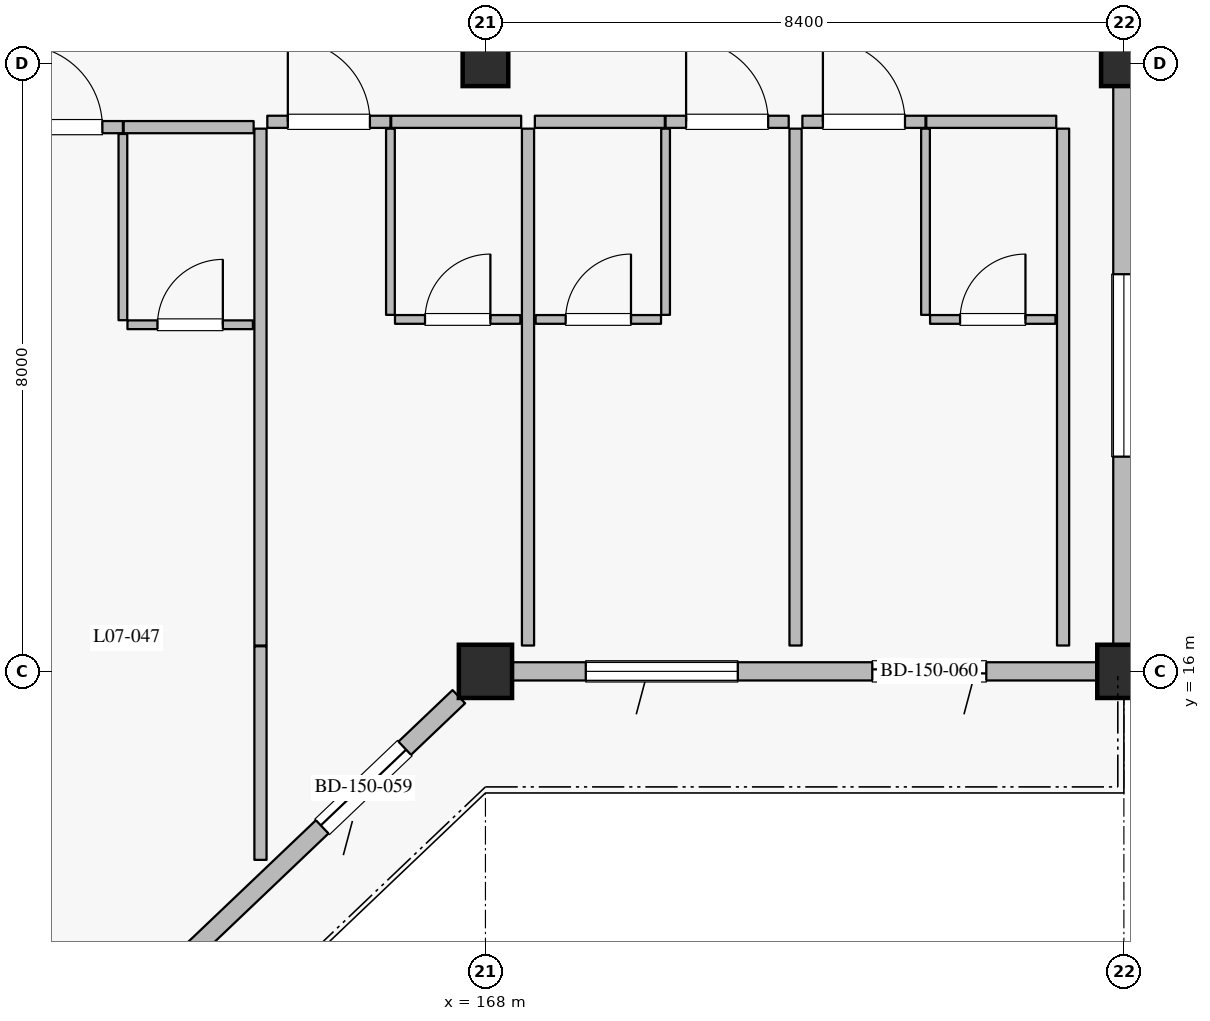
"""IFC4 building model, lengths in metres.
Left out: names, types, materials, properties, quantities, classifications, styles, units other than length and angle.
Written with IfcOpenShell. Run it as: python <this file> out.ifc"""

import sys

from ifc_helpers import new_model, si_unit, direction, frame, frame_2d, origin, origin_2d, place, context, subcontext, project, spatial, rectangle, extrude, element, fill, save


model = new_model("IFC4")
c1 = context("Model", 3, precision=1e-05, world=origin(), true_north=direction((0.0, 1.0)))
c2 = subcontext(c1, "Body", "Model", "MODEL_VIEW")
j1 = project(units=[si_unit("LENGTHUNIT", "METRE"), si_unit("PLANEANGLEUNIT", "RADIAN")], contexts=[c1])
p1 = place(None, origin())
s1 = spatial("IfcSite", under=j1, at=p1, CompositionType="ELEMENT")
p2 = place(p1, origin())
s2 = spatial("IfcBuilding", under=s1, at=p2, CompositionType="ELEMENT")
p3 = place(p2, frame((0.0, 0.0, 32.4)))
s3 = spatial("IfcBuildingStorey", under=s2, at=p3, CompositionType="ELEMENT", Elevation=32.4)
for number, where, z_axis, x_axis in (
    (1, (168.0, 16.0, 0.0), (0.0, 0.0, 1.0), (1.0, 0.0, 0.0)),
    (2, (176.4, 16.0, 0.0), (0.0, 0.0, 1.0), (1.0, 0.0, 0.0)),
):
    element("IfcColumn", number, at=place(p3, frame(where, z_axis=z_axis, x_axis=x_axis)), inside=s3, PredefinedType="COLUMN", context=c2, shape_type="SweptSolid", body=[
        extrude(rectangle(XDim=0.7, YDim=0.7, at=origin_2d()), origin(), (0.0, 0.0, 1.0), 3.6),
    ])
for number, where, z_axis, x_axis in (
    (3, (168.0, 24.0, 0.0), (0.0, 0.0, 1.0), (1.0, 0.0, 0.0)),
    (4, (176.4, 24.0, 0.0), (0.0, 0.0, 1.0), (1.0, 0.0, 0.0)),
):
    element("IfcColumn", number, at=place(p3, frame(where, z_axis=z_axis, x_axis=x_axis)), inside=s3, PredefinedType="COLUMN", context=c2, shape_type="SweptSolid", body=[
        extrude(rectangle(XDim=0.6, YDim=0.6, at=origin_2d()), origin(), (0.0, 0.0, 1.0), 3.6),
    ])
p4 = place(p3, frame((167.65, 15.667, 0.0), z_axis=(0.0, 0.0, 1.0), x_axis=(-0.724105170588, -0.689689569247, 0.0)))
e5 = element("IfcWall", 5, at=p4, inside=s3, PredefinedType="SOLIDWALL", context=c2, shape_type="SweptSolid", body=[
    extrude(rectangle(XDim=10.634, YDim=0.24, at=frame_2d((5.317, 0.0))), origin(), (0.0, 0.0, 1.0), 2.89),
])
p5 = place(p4, frame((0.983, 0.0, 0.0)))
e6 = element("IfcOpeningElement", 6, at=p5, cuts=e5, PredefinedType="OPENING", context=c2, shape_type="SweptSolid", body=[
    extrude(rectangle(XDim=1.5, YDim=2.25, at=frame_2d((0.75, 1.125))), frame((0.0, 0.13, 0.0), z_axis=(0.0, -1.0, 0.0), x_axis=(1.0, 0.0, 0.0)), (0.0, 0.0, 1.0), 0.26),
])
p6 = place(p4, frame((5.035, 0.0, 0.8)))
e7 = element("IfcOpeningElement", 7, at=p6, cuts=e5, PredefinedType="OPENING", context=c2, shape_type="SweptSolid", body=[
    extrude(rectangle(XDim=2.0, YDim=1.75, at=frame_2d((1.0, 0.875))), frame((0.0, 0.13, 0.0), z_axis=(0.0, -1.0, 0.0), x_axis=(1.0, 0.0, 0.0)), (0.0, 0.0, 1.0), 0.26),
])
p7 = place(p4, frame((8.819, 0.0, 0.8)))
e8 = element("IfcOpeningElement", 8, at=p7, cuts=e5, PredefinedType="OPENING", context=c2, shape_type="SweptSolid", body=[
    extrude(rectangle(XDim=1.6, YDim=1.6, at=frame_2d((0.8, 0.8))), frame((0.0, 0.13, 0.0), z_axis=(0.0, -1.0, 0.0), x_axis=(1.0, 0.0, 0.0)), (0.0, 0.0, 1.0), 0.26),
])
p8 = place(p3, frame((176.05, 16.0, 0.0), z_axis=(0.0, 0.0, 1.0), x_axis=(-1.0, 0.0, 0.0)))
e9 = element("IfcWall", 9, at=p8, inside=s3, PredefinedType="SOLIDWALL", context=c2, shape_type="SweptSolid", body=[
    extrude(rectangle(XDim=7.7, YDim=0.24, at=frame_2d((3.85, 0.0))), origin(), (0.0, 0.0, 1.0), 2.89),
])
p9 = place(p8, frame((1.46, 0.0, 0.0)))
e10 = element("IfcOpeningElement", 10, at=p9, cuts=e9, PredefinedType="OPENING", context=c2, shape_type="SweptSolid", body=[
    extrude(rectangle(XDim=1.5, YDim=2.25, at=frame_2d((0.75, 1.125))), frame((0.0, 0.13, 0.0), z_axis=(0.0, -1.0, 0.0), x_axis=(1.0, 0.0, 0.0)), (0.0, 0.0, 1.0), 0.26),
])
p10 = place(p8, frame((4.73, 0.0, 0.8)))
e11 = element("IfcOpeningElement", 11, at=p10, cuts=e9, PredefinedType="OPENING", context=c2, shape_type="SweptSolid", body=[
    extrude(rectangle(XDim=2.0, YDim=1.75, at=frame_2d((1.0, 0.875))), frame((0.0, 0.13, 0.0), z_axis=(0.0, -1.0, 0.0), x_axis=(1.0, 0.0, 0.0)), (0.0, 0.0, 1.0), 0.26),
])
p11 = place(p3, frame((176.4, 23.7, 0.0), z_axis=(0.0, 0.0, 1.0), x_axis=(0.0, -1.0, 0.0)))
e12 = element("IfcWall", 12, at=p11, inside=s3, PredefinedType="SOLIDWALL", context=c2, shape_type="SweptSolid", body=[
    extrude(rectangle(XDim=7.35, YDim=0.28, at=frame_2d((3.675, 0.0))), origin(), (0.0, 0.0, 1.0), 2.7),
])
p12 = place(p11, frame((2.475, 0.0, 0.5)))
e13 = element("IfcOpeningElement", 13, at=p12, cuts=e12, PredefinedType="OPENING", context=c2, shape_type="SweptSolid", body=[
    extrude(rectangle(XDim=2.4, YDim=1.65, at=frame_2d((1.2, 0.825))), frame((0.0, 0.15, 0.0), z_axis=(0.0, -1.0, 0.0), x_axis=(1.0, 0.0, 0.0)), (0.0, 0.0, 1.0), 0.3),
])
p13 = place(p3, frame((161.61, 23.16, 0.0), z_axis=(0.0, 0.0, 1.0), x_axis=(1.0, 0.0, 0.0)))
e14 = element("IfcWall", 14, at=p13, inside=s3, PredefinedType="PARTITIONING", context=c2, shape_type="SweptSolid", body=[
    extrude(rectangle(XDim=1.62, YDim=0.16, at=frame_2d((0.81, 0.0))), origin(), (0.0, 0.0, 1.0), 3.335),
])
p14 = place(p13, frame((0.27, 0.0, 0.0)))
e15 = element("IfcOpeningElement", 15, at=p14, cuts=e14, PredefinedType="OPENING", context=c2, shape_type="SweptSolid", body=[
    extrude(rectangle(XDim=1.08, YDim=2.3, at=frame_2d((0.54, 1.15))), frame((0.0, 0.09, 0.0), z_axis=(0.0, -1.0, 0.0), x_axis=(1.0, 0.0, 0.0)), (0.0, 0.0, 1.0), 0.18),
])
p15 = place(p3, frame((163.24, 23.16, 0.0), z_axis=(0.0, 0.0, 1.0), x_axis=(1.0, 0.0, 0.0)))
e16 = element("IfcWall", 16, at=p15, inside=s3, PredefinedType="PARTITIONING", context=c2, shape_type="SweptSolid", body=[
    extrude(rectangle(XDim=1.71, YDim=0.16, at=frame_2d((0.855, 0.0))), origin(), (0.0, 0.0, 1.0), 3.335),
])
p16 = place(p3, frame((163.23, 20.62, 0.0), z_axis=(0.0, 0.0, 1.0), x_axis=(0.0, 1.0, 0.0)))
e17 = element("IfcWall", 17, at=p16, inside=s3, PredefinedType="PARTITIONING", context=c2, shape_type="SweptSolid", body=[
    extrude(rectangle(XDim=2.45, YDim=0.115, at=frame_2d((1.225, 0.0))), origin(), (0.0, 0.0, 1.0), 3.335),
])
p17 = place(p3, frame((163.29, 20.56, 0.0), z_axis=(0.0, 0.0, 1.0), x_axis=(1.0, 0.0, 0.0)))
e18 = element("IfcWall", 18, at=p17, inside=s3, PredefinedType="PARTITIONING", context=c2, shape_type="SweptSolid", body=[
    extrude(rectangle(XDim=1.65, YDim=0.115, at=frame_2d((0.825, 0.0))), origin(), (0.0, 0.0, 1.0), 3.335),
])
p18 = place(p17, frame((0.395, 0.0, 0.0)))
e19 = element("IfcOpeningElement", 19, at=p18, cuts=e18, PredefinedType="OPENING", context=c2, shape_type="SweptSolid", body=[
    extrude(rectangle(XDim=0.86, YDim=2.12, at=frame_2d((0.43, 1.06))), frame((0.0, 0.067, 0.0), z_axis=(0.0, -1.0, 0.0), x_axis=(1.0, 0.0, 0.0)), (0.0, 0.0, 1.0), 0.135),
])
p19 = place(p3, frame((165.04, 13.52, 0.0), z_axis=(0.0, 0.0, 1.0), x_axis=(0.0, 1.0, 0.0)))
e20 = element("IfcWall", 20, at=p19, inside=s3, PredefinedType="PARTITIONING", context=c2, shape_type="SweptSolid", body=[
    extrude(rectangle(XDim=2.81, YDim=0.16, at=frame_2d((1.405, 0.0))), origin(), (0.0, 0.0, 1.0), 3.335),
])
p20 = place(p3, frame((165.13, 23.23, 0.0), z_axis=(0.0, 0.0, 1.0), x_axis=(1.0, 0.0, 0.0)))
e21 = element("IfcWall", 21, at=p20, inside=s3, PredefinedType="PARTITIONING", context=c2, shape_type="SweptSolid", body=[
    extrude(rectangle(XDim=1.62, YDim=0.16, at=frame_2d((0.81, 0.0))), origin(), (0.0, 0.0, 1.0), 3.335),
])
p21 = place(p20, frame((0.27, 0.0, 0.0)))
e22 = element("IfcOpeningElement", 22, at=p21, cuts=e21, PredefinedType="OPENING", context=c2, shape_type="SweptSolid", body=[
    extrude(rectangle(XDim=1.08, YDim=2.3, at=frame_2d((0.54, 1.15))), frame((0.0, 0.09, 0.0), z_axis=(0.0, -1.0, 0.0), x_axis=(1.0, 0.0, 0.0)), (0.0, 0.0, 1.0), 0.18),
])
p22 = place(p3, frame((166.76, 23.23, 0.0), z_axis=(0.0, 0.0, 1.0), x_axis=(1.0, 0.0, 0.0)))
e23 = element("IfcWall", 23, at=p22, inside=s3, PredefinedType="PARTITIONING", context=c2, shape_type="SweptSolid", body=[
    extrude(rectangle(XDim=1.71, YDim=0.16, at=frame_2d((0.855, 0.0))), origin(), (0.0, 0.0, 1.0), 3.335),
])
p23 = place(p3, frame((166.75, 20.69, 0.0), z_axis=(0.0, 0.0, 1.0), x_axis=(0.0, 1.0, 0.0)))
e24 = element("IfcWall", 24, at=p23, inside=s3, PredefinedType="PARTITIONING", context=c2, shape_type="SweptSolid", body=[
    extrude(rectangle(XDim=2.45, YDim=0.115, at=frame_2d((1.225, 0.0))), origin(), (0.0, 0.0, 1.0), 3.335),
])
p24 = place(p3, frame((166.81, 20.63, 0.0), z_axis=(0.0, 0.0, 1.0), x_axis=(1.0, 0.0, 0.0)))
e25 = element("IfcWall", 25, at=p24, inside=s3, PredefinedType="PARTITIONING", context=c2, shape_type="SweptSolid", body=[
    extrude(rectangle(XDim=1.65, YDim=0.115, at=frame_2d((0.825, 0.0))), origin(), (0.0, 0.0, 1.0), 3.335),
])
p25 = place(p24, frame((0.395, 0.0, 0.0)))
e26 = element("IfcOpeningElement", 26, at=p25, cuts=e25, PredefinedType="OPENING", context=c2, shape_type="SweptSolid", body=[
    extrude(rectangle(XDim=0.86, YDim=2.12, at=frame_2d((0.43, 1.06))), frame((0.0, 0.067, 0.0), z_axis=(0.0, -1.0, 0.0), x_axis=(1.0, 0.0, 0.0)), (0.0, 0.0, 1.0), 0.135),
])
p26 = place(p3, frame((165.04, 16.34, 0.0), z_axis=(0.0, 0.0, 1.0), x_axis=(0.0, 1.0, 0.0)))
e27 = element("IfcWall", 27, at=p26, inside=s3, PredefinedType="PARTITIONING", context=c2, shape_type="SweptSolid", body=[
    extrude(rectangle(XDim=6.8, YDim=0.16, at=frame_2d((3.4, 0.0))), origin(), (0.0, 0.0, 1.0), 3.335),
])
p27 = place(p3, frame((168.65, 23.23, 0.0), z_axis=(0.0, 0.0, 1.0), x_axis=(1.0, 0.0, 0.0)))
e28 = element("IfcWall", 28, at=p27, inside=s3, PredefinedType="PARTITIONING", context=c2, shape_type="SweptSolid", body=[
    extrude(rectangle(XDim=1.71, YDim=0.16, at=frame_2d((0.855, 0.0))), origin(), (0.0, 0.0, 1.0), 3.335),
])
p28 = place(p3, frame((170.37, 23.23, 0.0), z_axis=(0.0, 0.0, 1.0), x_axis=(1.0, 0.0, 0.0)))
e29 = element("IfcWall", 29, at=p28, inside=s3, PredefinedType="PARTITIONING", context=c2, shape_type="SweptSolid", body=[
    extrude(rectangle(XDim=1.62, YDim=0.16, at=frame_2d((0.81, 0.0))), origin(), (0.0, 0.0, 1.0), 3.335),
])
p29 = place(p28, frame((0.27, 0.0, 0.0)))
e30 = element("IfcOpeningElement", 30, at=p29, cuts=e29, PredefinedType="OPENING", context=c2, shape_type="SweptSolid", body=[
    extrude(rectangle(XDim=1.08, YDim=2.3, at=frame_2d((0.54, 1.15))), frame((0.0, 0.09, 0.0), z_axis=(0.0, -1.0, 0.0), x_axis=(1.0, 0.0, 0.0)), (0.0, 0.0, 1.0), 0.18),
])
p30 = place(p3, frame((170.37, 20.69, 0.0), z_axis=(0.0, 0.0, 1.0), x_axis=(0.0, 1.0, 0.0)))
e31 = element("IfcWall", 31, at=p30, inside=s3, PredefinedType="PARTITIONING", context=c2, shape_type="SweptSolid", body=[
    extrude(rectangle(XDim=2.45, YDim=0.115, at=frame_2d((1.225, 0.0))), origin(), (0.0, 0.0, 1.0), 3.335),
])
p31 = place(p3, frame((168.66, 20.63, 0.0), z_axis=(0.0, 0.0, 1.0), x_axis=(1.0, 0.0, 0.0)))
e32 = element("IfcWall", 32, at=p31, inside=s3, PredefinedType="PARTITIONING", context=c2, shape_type="SweptSolid", body=[
    extrude(rectangle(XDim=1.65, YDim=0.115, at=frame_2d((0.825, 0.0))), origin(), (0.0, 0.0, 1.0), 3.335),
])
p32 = place(p31, frame((0.395, 0.0, 0.0)))
e33 = element("IfcOpeningElement", 33, at=p32, cuts=e32, PredefinedType="OPENING", context=c2, shape_type="SweptSolid", body=[
    extrude(rectangle(XDim=0.86, YDim=2.12, at=frame_2d((0.43, 1.06))), frame((0.0, 0.067, 0.0), z_axis=(0.0, -1.0, 0.0), x_axis=(1.0, 0.0, 0.0)), (0.0, 0.0, 1.0), 0.135),
])
p33 = place(p3, frame((168.56, 16.34, 0.0), z_axis=(0.0, 0.0, 1.0), x_axis=(0.0, 1.0, 0.0)))
e34 = element("IfcWall", 34, at=p33, inside=s3, PredefinedType="PARTITIONING", context=c2, shape_type="SweptSolid", body=[
    extrude(rectangle(XDim=6.8, YDim=0.16, at=frame_2d((3.4, 0.0))), origin(), (0.0, 0.0, 1.0), 3.335),
])
p34 = place(p3, frame((172.17, 23.23, 0.0), z_axis=(0.0, 0.0, 1.0), x_axis=(1.0, 0.0, 0.0)))
e35 = element("IfcWall", 35, at=p34, inside=s3, PredefinedType="PARTITIONING", context=c2, shape_type="SweptSolid", body=[
    extrude(rectangle(XDim=1.62, YDim=0.16, at=frame_2d((0.81, 0.0))), origin(), (0.0, 0.0, 1.0), 3.335),
])
p35 = place(p34, frame((0.27, 0.0, 0.0)))
e36 = element("IfcOpeningElement", 36, at=p35, cuts=e35, PredefinedType="OPENING", context=c2, shape_type="SweptSolid", body=[
    extrude(rectangle(XDim=1.08, YDim=2.3, at=frame_2d((0.54, 1.15))), frame((0.0, 0.09, 0.0), z_axis=(0.0, -1.0, 0.0), x_axis=(1.0, 0.0, 0.0)), (0.0, 0.0, 1.0), 0.18),
])
p36 = place(p3, frame((173.8, 23.23, 0.0), z_axis=(0.0, 0.0, 1.0), x_axis=(1.0, 0.0, 0.0)))
e37 = element("IfcWall", 37, at=p36, inside=s3, PredefinedType="PARTITIONING", context=c2, shape_type="SweptSolid", body=[
    extrude(rectangle(XDim=1.71, YDim=0.16, at=frame_2d((0.855, 0.0))), origin(), (0.0, 0.0, 1.0), 3.335),
])
p37 = place(p3, frame((173.79, 20.69, 0.0), z_axis=(0.0, 0.0, 1.0), x_axis=(0.0, 1.0, 0.0)))
e38 = element("IfcWall", 38, at=p37, inside=s3, PredefinedType="PARTITIONING", context=c2, shape_type="SweptSolid", body=[
    extrude(rectangle(XDim=2.45, YDim=0.115, at=frame_2d((1.225, 0.0))), origin(), (0.0, 0.0, 1.0), 3.335),
])
p38 = place(p3, frame((173.85, 20.63, 0.0), z_axis=(0.0, 0.0, 1.0), x_axis=(1.0, 0.0, 0.0)))
e39 = element("IfcWall", 39, at=p38, inside=s3, PredefinedType="PARTITIONING", context=c2, shape_type="SweptSolid", body=[
    extrude(rectangle(XDim=1.65, YDim=0.115, at=frame_2d((0.825, 0.0))), origin(), (0.0, 0.0, 1.0), 3.335),
])
p39 = place(p38, frame((0.395, 0.0, 0.0)))
e40 = element("IfcOpeningElement", 40, at=p39, cuts=e39, PredefinedType="OPENING", context=c2, shape_type="SweptSolid", body=[
    extrude(rectangle(XDim=0.86, YDim=2.12, at=frame_2d((0.43, 1.06))), frame((0.0, 0.067, 0.0), z_axis=(0.0, -1.0, 0.0), x_axis=(1.0, 0.0, 0.0)), (0.0, 0.0, 1.0), 0.135),
])
for number, where, z_axis, x_axis in (
    (41, (172.08, 16.34, 0.0), (0.0, 0.0, 1.0), (0.0, 1.0, 0.0)),
    (42, (175.6, 16.34, 0.0), (0.0, 0.0, 1.0), (0.0, 1.0, 0.0)),
):
    element("IfcWall", number, at=place(p3, frame(where, z_axis=z_axis, x_axis=x_axis)), inside=s3, PredefinedType="PARTITIONING", context=c2, shape_type="SweptSolid", body=[
        extrude(rectangle(XDim=6.8, YDim=0.16, at=frame_2d((3.4, 0.0))), origin(), (0.0, 0.0, 1.0), 3.335),
    ])
p40 = place(p5, origin())
e43 = element("IfcDoor", 43, at=p40, inside=s3, OperationType="SLIDING_TO_LEFT", PredefinedType="DOOR", context=c2, shape_type="SweptSolid", body=[
    extrude(rectangle(XDim=1.5, YDim=2.25, at=frame_2d((0.75, 1.125))), frame((0.0, 0.025, 0.0), z_axis=(0.0, -1.0, 0.0), x_axis=(1.0, 0.0, 0.0)), (0.0, 0.0, 1.0), 0.05),
])
fill(e6, e43)
p41 = place(p9, origin())
e44 = element("IfcDoor", 44, at=p41, inside=s3, OperationType="SLIDING_TO_LEFT", PredefinedType="DOOR", context=c2, shape_type="SweptSolid", body=[
    extrude(rectangle(XDim=1.5, YDim=2.25, at=frame_2d((0.75, 1.125))), frame((0.0, 0.025, 0.0), z_axis=(0.0, -1.0, 0.0), x_axis=(1.0, 0.0, 0.0)), (0.0, 0.0, 1.0), 0.05),
])
fill(e10, e44)
p42 = place(p10, origin())
e45 = element("IfcWindow", 45, at=p42, inside=s3, PartitioningType="DOUBLE_PANEL_VERTICAL", PredefinedType="WINDOW", context=c2, shape_type="SweptSolid", body=[
    extrude(rectangle(XDim=2.0, YDim=1.75, at=frame_2d((1.0, 0.875))), frame((0.0, 0.03, 0.0), z_axis=(0.0, -1.0, 0.0), x_axis=(1.0, 0.0, 0.0)), (0.0, 0.0, 1.0), 0.06),
])
fill(e11, e45)
p43 = place(p12, origin())
e46 = element("IfcWindow", 46, at=p43, inside=s3, PartitioningType="DOUBLE_PANEL_VERTICAL", PredefinedType="WINDOW", context=c2, shape_type="SweptSolid", body=[
    extrude(rectangle(XDim=2.4, YDim=1.65, at=frame_2d((1.2, 0.825))), frame((0.0, 0.03, 0.0), z_axis=(0.0, -1.0, 0.0), x_axis=(1.0, 0.0, 0.0)), (0.0, 0.0, 1.0), 0.06),
])
fill(e13, e46)
p44 = place(p14, origin())
e47 = element("IfcDoor", 47, at=p44, inside=s3, OperationType="SINGLE_SWING_LEFT", PredefinedType="DOOR", context=c2, shape_type="SweptSolid", body=[
    extrude(rectangle(XDim=1.08, YDim=2.3, at=frame_2d((0.54, 1.15))), frame((0.0, 0.025, 0.0), z_axis=(0.0, -1.0, 0.0), x_axis=(1.0, 0.0, 0.0)), (0.0, 0.0, 1.0), 0.05),
])
fill(e15, e47)
p45 = place(p18, origin())
e48 = element("IfcDoor", 48, at=p45, inside=s3, OperationType="SINGLE_SWING_RIGHT", PredefinedType="DOOR", context=c2, shape_type="SweptSolid", body=[
    extrude(rectangle(XDim=0.86, YDim=2.12, at=frame_2d((0.43, 1.06))), frame((0.0, 0.025, 0.0), z_axis=(0.0, -1.0, 0.0), x_axis=(1.0, 0.0, 0.0)), (0.0, 0.0, 1.0), 0.05),
])
fill(e19, e48)
p46 = place(p21, origin())
e49 = element("IfcDoor", 49, at=p46, inside=s3, OperationType="SINGLE_SWING_LEFT", PredefinedType="DOOR", context=c2, shape_type="SweptSolid", body=[
    extrude(rectangle(XDim=1.08, YDim=2.3, at=frame_2d((0.54, 1.15))), frame((0.0, 0.025, 0.0), z_axis=(0.0, -1.0, 0.0), x_axis=(1.0, 0.0, 0.0)), (0.0, 0.0, 1.0), 0.05),
])
fill(e22, e49)
p47 = place(p25, origin())
e50 = element("IfcDoor", 50, at=p47, inside=s3, OperationType="SINGLE_SWING_RIGHT", PredefinedType="DOOR", context=c2, shape_type="SweptSolid", body=[
    extrude(rectangle(XDim=0.86, YDim=2.12, at=frame_2d((0.43, 1.06))), frame((0.0, 0.025, 0.0), z_axis=(0.0, -1.0, 0.0), x_axis=(1.0, 0.0, 0.0)), (0.0, 0.0, 1.0), 0.05),
])
fill(e26, e50)
p48 = place(p29, origin())
e51 = element("IfcDoor", 51, at=p48, inside=s3, OperationType="SINGLE_SWING_LEFT", PredefinedType="DOOR", context=c2, shape_type="SweptSolid", body=[
    extrude(rectangle(XDim=1.08, YDim=2.3, at=frame_2d((0.54, 1.15))), frame((0.0, 0.025, 0.0), z_axis=(0.0, -1.0, 0.0), x_axis=(1.0, 0.0, 0.0)), (0.0, 0.0, 1.0), 0.05),
])
fill(e30, e51)
p49 = place(p32, origin())
e52 = element("IfcDoor", 52, at=p49, inside=s3, OperationType="SINGLE_SWING_RIGHT", PredefinedType="DOOR", context=c2, shape_type="SweptSolid", body=[
    extrude(rectangle(XDim=0.86, YDim=2.12, at=frame_2d((0.43, 1.06))), frame((0.0, 0.025, 0.0), z_axis=(0.0, -1.0, 0.0), x_axis=(1.0, 0.0, 0.0)), (0.0, 0.0, 1.0), 0.05),
])
fill(e33, e52)
p50 = place(p35, origin())
e53 = element("IfcDoor", 53, at=p50, inside=s3, OperationType="SINGLE_SWING_LEFT", PredefinedType="DOOR", context=c2, shape_type="SweptSolid", body=[
    extrude(rectangle(XDim=1.08, YDim=2.3, at=frame_2d((0.54, 1.15))), frame((0.0, 0.025, 0.0), z_axis=(0.0, -1.0, 0.0), x_axis=(1.0, 0.0, 0.0)), (0.0, 0.0, 1.0), 0.05),
])
fill(e36, e53)
p51 = place(p39, origin())
e54 = element("IfcDoor", 54, at=p51, inside=s3, OperationType="SINGLE_SWING_RIGHT", PredefinedType="DOOR", context=c2, shape_type="SweptSolid", body=[
    extrude(rectangle(XDim=0.86, YDim=2.12, at=frame_2d((0.43, 1.06))), frame((0.0, 0.025, 0.0), z_axis=(0.0, -1.0, 0.0), x_axis=(1.0, 0.0, 0.0)), (0.0, 0.0, 1.0), 0.05),
])
fill(e40, e54)
save(model, sys.argv[1])
